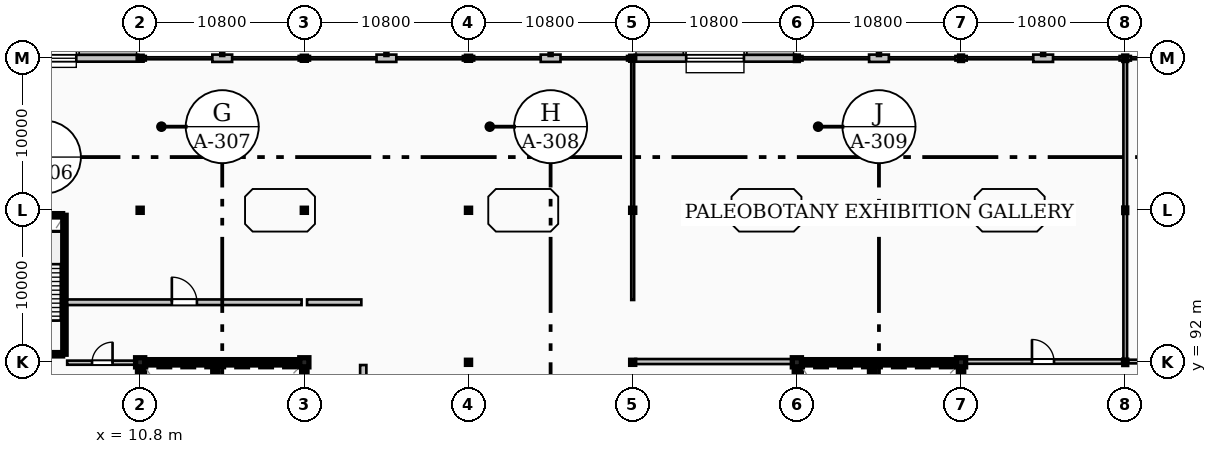
"""IFC4 building model, lengths in metres.
Left out: names, types, materials, properties, quantities, classifications, styles, units other than length and angle.
Written with IfcOpenShell. Run it as: python <this file> out.ifc"""

import sys

from ifc_helpers import new_model, si_unit, direction, frame, frame_2d, origin, origin_2d, place, context, subcontext, project, spatial, rectangle, hollow_rectangle, hollow_circle, extrude, element, fill, save


model = new_model("IFC4")
c1 = context("Model", 3, precision=1e-05, world=origin(), true_north=direction((0.0, 1.0)))
c2 = subcontext(c1, "Body", "Model", "MODEL_VIEW")
j1 = project(units=[si_unit("LENGTHUNIT", "METRE"), si_unit("PLANEANGLEUNIT", "RADIAN")], contexts=[c1])
p1 = place(None, origin())
s1 = spatial("IfcSite", under=j1, at=p1, CompositionType="ELEMENT")
p2 = place(p1, origin())
s2 = spatial("IfcBuilding", under=s1, at=p2, CompositionType="ELEMENT")
p3 = place(p2, frame((0.0, 0.0, 9.6)))
s3 = spatial("IfcBuildingStorey", under=s2, at=p3, CompositionType="ELEMENT", Elevation=9.6)
p4 = place(p3, frame((10.8, 92.0, 0.0), z_axis=(0.0, 0.0, 1.0), x_axis=(1.0, 0.0, 0.0)))
e1 = element("IfcColumn", 1, at=p4, inside=s3, PredefinedType="COLUMN", context=c2, shape_type="SweptSolid", body=[
    extrude(rectangle(XDim=0.6, YDim=0.6, at=origin_2d()), origin(), (0.0, 0.0, 1.0), 4.8),
])
for number, where, z_axis, x_axis in (
    (2, (10.8, 102.0, 0.0), (0.0, 0.0, 1.0), (1.0, 0.0, 0.0)),
    (3, (10.8, 112.0, 0.0), (0.0, 0.0, 1.0), (1.0, 0.0, 0.0)),
):
    element("IfcColumn", number, at=place(p3, frame(where, z_axis=z_axis, x_axis=x_axis)), inside=s3, PredefinedType="COLUMN", context=c2, shape_type="SweptSolid", body=[
        extrude(hollow_circle(Radius=0.136, WallThickness=0.012, at=origin_2d()), origin(), (0.0, 0.0, 1.0), 4.8),
    ])
p5 = place(p3, frame((21.6, 92.0, 0.0), z_axis=(0.0, 0.0, 1.0), x_axis=(1.0, 0.0, 0.0)))
e4 = element("IfcColumn", 4, at=p5, inside=s3, PredefinedType="COLUMN", context=c2, shape_type="SweptSolid", body=[
    extrude(rectangle(XDim=0.6, YDim=0.6, at=origin_2d()), origin(), (0.0, 0.0, 1.0), 4.8),
])
for number, where, z_axis, x_axis in (
    (5, (21.6, 102.0, 0.0), (0.0, 0.0, 1.0), (1.0, 0.0, 0.0)),
    (6, (21.6, 112.0, 0.0), (0.0, 0.0, 1.0), (1.0, 0.0, 0.0)),
    (7, (32.4, 92.0, 0.0), (0.0, 0.0, 1.0), (1.0, 0.0, 0.0)),
    (8, (32.4, 102.0, 0.0), (0.0, 0.0, 1.0), (1.0, 0.0, 0.0)),
    (9, (32.4, 112.0, 0.0), (0.0, 0.0, 1.0), (1.0, 0.0, 0.0)),
    (10, (43.2, 92.0, 0.0), (0.0, 0.0, 1.0), (1.0, 0.0, 0.0)),
    (11, (43.2, 102.0, 0.0), (0.0, 0.0, 1.0), (1.0, 0.0, 0.0)),
    (12, (43.2, 112.0, 0.0), (0.0, 0.0, 1.0), (1.0, 0.0, 0.0)),
):
    element("IfcColumn", number, at=place(p3, frame(where, z_axis=z_axis, x_axis=x_axis)), inside=s3, PredefinedType="COLUMN", context=c2, shape_type="SweptSolid", body=[
        extrude(hollow_circle(Radius=0.136, WallThickness=0.012, at=origin_2d()), origin(), (0.0, 0.0, 1.0), 4.8),
    ])
p6 = place(p3, frame((54.0, 92.0, 0.0), z_axis=(0.0, 0.0, 1.0), x_axis=(1.0, 0.0, 0.0)))
e13 = element("IfcColumn", 13, at=p6, inside=s3, PredefinedType="COLUMN", context=c2, shape_type="SweptSolid", body=[
    extrude(rectangle(XDim=0.6, YDim=0.6, at=origin_2d()), origin(), (0.0, 0.0, 1.0), 4.8),
])
for number, where, z_axis, x_axis in (
    (14, (54.0, 102.0, 0.0), (0.0, 0.0, 1.0), (1.0, 0.0, 0.0)),
    (15, (54.0, 112.0, 0.0), (0.0, 0.0, 1.0), (1.0, 0.0, 0.0)),
):
    element("IfcColumn", number, at=place(p3, frame(where, z_axis=z_axis, x_axis=x_axis)), inside=s3, PredefinedType="COLUMN", context=c2, shape_type="SweptSolid", body=[
        extrude(hollow_rectangle(XDim=0.2, YDim=0.3, WallThickness=0.012, InnerFilletRadius=0.012, OuterFilletRadius=0.025, at=origin_2d()), origin(), (0.0, 0.0, 1.0), 4.8),
    ])
p7 = place(p3, frame((64.8, 92.0, 0.0), z_axis=(0.0, 0.0, 1.0), x_axis=(1.0, 0.0, 0.0)))
e16 = element("IfcColumn", 16, at=p7, inside=s3, PredefinedType="COLUMN", context=c2, shape_type="SweptSolid", body=[
    extrude(rectangle(XDim=0.6, YDim=0.6, at=origin_2d()), origin(), (0.0, 0.0, 1.0), 4.8),
])
for number, where, z_axis, x_axis in (
    (17, (64.8, 102.0, 0.0), (0.0, 0.0, 1.0), (1.0, 0.0, 0.0)),
    (18, (64.8, 112.0, 0.0), (0.0, 0.0, 1.0), (1.0, 0.0, 0.0)),
    (19, (75.6, 92.0, 0.0), (0.0, 0.0, 1.0), (1.0, 0.0, 0.0)),
    (20, (75.6, 102.0, 0.0), (0.0, 0.0, 1.0), (1.0, 0.0, 0.0)),
    (21, (75.6, 112.0, 0.0), (0.0, 0.0, 1.0), (1.0, 0.0, 0.0)),
):
    element("IfcColumn", number, at=place(p3, frame(where, z_axis=z_axis, x_axis=x_axis)), inside=s3, PredefinedType="COLUMN", context=c2, shape_type="SweptSolid", body=[
        extrude(hollow_rectangle(XDim=0.2, YDim=0.3, WallThickness=0.012, InnerFilletRadius=0.012, OuterFilletRadius=0.025, at=origin_2d()), origin(), (0.0, 0.0, 1.0), 4.8),
    ])
p8 = place(p3, frame((75.97, 112.0, 0.0), z_axis=(0.0, 0.0, 1.0), x_axis=(-1.0, 0.0, 0.0)))
e22 = element("IfcWall", 22, at=p8, inside=s3, PredefinedType="STANDARD", context=c2, shape_type="SweptSolid", body=[
    extrude(rectangle(XDim=0.274, YDim=0.3, at=frame_2d((0.137, 0.0))), origin(), (0.0, 0.0, 1.0), 4.56),
])
p9 = place(p3, frame((70.85, 112.0, 0.0), z_axis=(0.0, 0.0, 1.0), x_axis=(-1.0, 0.0, 0.0)))
e23 = element("IfcWall", 23, at=p9, inside=s3, PredefinedType="STANDARD", context=c2, shape_type="SweptSolid", body=[
    extrude(rectangle(XDim=1.3, YDim=0.48, at=frame_2d((0.65, 0.0))), origin(), (0.0, 0.0, 1.0), 4.119),
])
for number, where, z_axis, x_axis in (
    (24, (75.504, 112.0, 0.0), (0.0, 0.0, 1.0), (-1.0, 0.0, 0.0)),
    (25, (65.17, 112.0, 0.0), (0.0, 0.0, 1.0), (-1.0, 0.0, 0.0)),
):
    element("IfcWall", number, at=place(p3, frame(where, z_axis=z_axis, x_axis=x_axis)), inside=s3, PredefinedType="STANDARD", context=c2, shape_type="SweptSolid", body=[
        extrude(rectangle(XDim=0.274, YDim=0.3, at=frame_2d((0.137, 0.0))), origin(), (0.0, 0.0, 1.0), 4.56),
    ])
p10 = place(p3, frame((60.05, 112.0, 0.0), z_axis=(0.0, 0.0, 1.0), x_axis=(-1.0, 0.0, 0.0)))
e26 = element("IfcWall", 26, at=p10, inside=s3, PredefinedType="STANDARD", context=c2, shape_type="SweptSolid", body=[
    extrude(rectangle(XDim=1.3, YDim=0.48, at=frame_2d((0.65, 0.0))), origin(), (0.0, 0.0, 1.0), 4.119),
])
for number, where, z_axis, x_axis in (
    (27, (64.704, 112.0, 0.0), (0.0, 0.0, 1.0), (-1.0, 0.0, 0.0)),
    (28, (54.37, 112.0, 0.0), (0.0, 0.0, 1.0), (-1.0, 0.0, 0.0)),
):
    element("IfcWall", number, at=place(p3, frame(where, z_axis=z_axis, x_axis=x_axis)), inside=s3, PredefinedType="STANDARD", context=c2, shape_type="SweptSolid", body=[
        extrude(rectangle(XDim=0.274, YDim=0.3, at=frame_2d((0.137, 0.0))), origin(), (0.0, 0.0, 1.0), 4.56),
    ])
p11 = place(p3, frame((53.904, 112.0, 0.0), z_axis=(0.0, 0.0, 1.0), x_axis=(-1.0, 0.0, 0.0)))
e29 = element("IfcWall", 29, at=p11, inside=s3, PredefinedType="STANDARD", context=c2, shape_type="SweptSolid", body=[
    extrude(rectangle(XDim=10.572, YDim=0.45, at=frame_2d((5.286, 0.0))), origin(), (0.0, 0.0, 1.0), 4.119),
])
p12 = place(p11, frame((3.386, 0.0, 1.0)))
e30 = element("IfcOpeningElement", 30, at=p12, cuts=e29, PredefinedType="OPENING", context=c2, shape_type="SweptSolid", body=[
    extrude(rectangle(XDim=3.8, YDim=2.1, at=frame_2d((1.9, 1.05))), frame((0.0, 0.235, 0.0), z_axis=(0.0, -1.0, 0.0), x_axis=(1.0, 0.0, 0.0)), (0.0, 0.0, 1.0), 0.47),
])
p13 = place(p3, frame((38.45, 112.0, 0.0), z_axis=(0.0, 0.0, 1.0), x_axis=(-1.0, 0.0, 0.0)))
e31 = element("IfcWall", 31, at=p13, inside=s3, PredefinedType="STANDARD", context=c2, shape_type="SweptSolid", body=[
    extrude(rectangle(XDim=1.3, YDim=0.48, at=frame_2d((0.65, 0.0))), origin(), (0.0, 0.0, 1.0), 4.119),
])
p14 = place(p3, frame((43.067, 112.0, 0.0), z_axis=(0.0, 0.0, 1.0), x_axis=(-1.0, 0.0, 0.0)))
e32 = element("IfcWall", 32, at=p14, inside=s3, PredefinedType="STANDARD", context=c2, shape_type="SweptSolid", body=[
    extrude(rectangle(XDim=0.237, YDim=0.3, at=frame_2d((0.119, 0.0))), origin(), (0.0, 0.0, 1.0), 4.56),
])
p15 = place(p3, frame((32.77, 112.0, 0.0), z_axis=(0.0, 0.0, 1.0), x_axis=(-1.0, 0.0, 0.0)))
e33 = element("IfcWall", 33, at=p15, inside=s3, PredefinedType="STANDARD", context=c2, shape_type="SweptSolid", body=[
    extrude(rectangle(XDim=0.238, YDim=0.3, at=frame_2d((0.119, 0.0))), origin(), (0.0, 0.0, 1.0), 4.56),
])
p16 = place(p3, frame((27.65, 112.0, 0.0), z_axis=(0.0, 0.0, 1.0), x_axis=(-1.0, 0.0, 0.0)))
e34 = element("IfcWall", 34, at=p16, inside=s3, PredefinedType="STANDARD", context=c2, shape_type="SweptSolid", body=[
    extrude(rectangle(XDim=1.3, YDim=0.48, at=frame_2d((0.65, 0.0))), origin(), (0.0, 0.0, 1.0), 4.119),
])
for number, where, z_axis, x_axis in (
    (35, (32.268, 112.0, 0.0), (0.0, 0.0, 1.0), (-1.0, 0.0, 0.0)),
    (36, (21.97, 112.0, 0.0), (0.0, 0.0, 1.0), (-1.0, 0.0, 0.0)),
):
    element("IfcWall", number, at=place(p3, frame(where, z_axis=z_axis, x_axis=x_axis)), inside=s3, PredefinedType="STANDARD", context=c2, shape_type="SweptSolid", body=[
        extrude(rectangle(XDim=0.238, YDim=0.3, at=frame_2d((0.119, 0.0))), origin(), (0.0, 0.0, 1.0), 4.56),
    ])
p17 = place(p3, frame((16.85, 112.0, 0.0), z_axis=(0.0, 0.0, 1.0), x_axis=(-1.0, 0.0, 0.0)))
e37 = element("IfcWall", 37, at=p17, inside=s3, PredefinedType="STANDARD", context=c2, shape_type="SweptSolid", body=[
    extrude(rectangle(XDim=1.3, YDim=0.48, at=frame_2d((0.65, 0.0))), origin(), (0.0, 0.0, 1.0), 4.119),
])
p18 = place(p3, frame((21.468, 112.0, 0.0), z_axis=(0.0, 0.0, 1.0), x_axis=(-1.0, 0.0, 0.0)))
e38 = element("IfcWall", 38, at=p18, inside=s3, PredefinedType="STANDARD", context=c2, shape_type="SweptSolid", body=[
    extrude(rectangle(XDim=0.238, YDim=0.3, at=frame_2d((0.119, 0.0))), origin(), (0.0, 0.0, 1.0), 4.56),
])
p19 = place(p3, frame((11.17, 112.0, 0.0), z_axis=(0.0, 0.0, 1.0), x_axis=(-1.0, 0.0, 0.0)))
e39 = element("IfcWall", 39, at=p19, inside=s3, PredefinedType="STANDARD", context=c2, shape_type="SweptSolid", body=[
    extrude(rectangle(XDim=0.237, YDim=0.3, at=frame_2d((0.119, 0.0))), origin(), (0.0, 0.0, 1.0), 4.56),
])
p20 = place(p3, frame((10.667, 112.0, 0.0), z_axis=(0.0, 0.0, 1.0), x_axis=(-1.0, 0.0, 0.0)))
e40 = element("IfcWall", 40, at=p20, inside=s3, PredefinedType="STANDARD", context=c2, shape_type="SweptSolid", body=[
    extrude(rectangle(XDim=10.535, YDim=0.45, at=frame_2d((5.268, 0.0))), origin(), (0.0, 0.0, 1.0), 4.119),
])
p21 = place(p20, frame((4.067, 0.0, 1.0)))
e41 = element("IfcOpeningElement", 41, at=p21, cuts=e40, PredefinedType="OPENING", context=c2, shape_type="SweptSolid", body=[
    extrude(rectangle(XDim=2.4, YDim=2.4, at=frame_2d((1.2, 1.2))), frame((0.0, 0.235, 0.0), z_axis=(0.0, -1.0, 0.0), x_axis=(1.0, 0.0, 0.0)), (0.0, 0.0, 1.0), 0.47),
])
p22 = place(p3, frame((11.1, 92.0, 0.0), z_axis=(0.0, 0.0, 1.0), x_axis=(1.0, 0.0, 0.0)))
e42 = element("IfcWall", 42, at=p22, inside=s3, PredefinedType="SHEAR", context=c2, shape_type="SweptSolid", body=[
    extrude(rectangle(XDim=10.2, YDim=0.35, at=frame_2d((5.1, 0.0))), origin(), (0.0, 0.0, 1.0), 4.56),
])
p23 = place(p3, frame((10.8, 82.3, 0.0), z_axis=(0.0, 0.0, 1.0), x_axis=(0.0, 1.0, 0.0)))
e43 = element("IfcWall", 43, at=p23, inside=s3, PredefinedType="SHEAR", context=c2, shape_type="SweptSolid", body=[
    extrude(rectangle(XDim=9.4, YDim=0.35, at=frame_2d((4.7, 0.0))), origin(), (0.0, 0.0, 1.0), 4.56),
])
p24 = place(p3, frame((21.6, 82.3, 0.0), z_axis=(0.0, 0.0, 1.0), x_axis=(0.0, 1.0, 0.0)))
e44 = element("IfcWall", 44, at=p24, inside=s3, PredefinedType="SHEAR", context=c2, shape_type="SweptSolid", body=[
    extrude(rectangle(XDim=9.4, YDim=0.35, at=frame_2d((4.7, 0.0))), origin(), (0.0, 0.0, 1.0), 4.56),
])
p25 = place(p24, frame((0.88, 0.0, 0.0)))
e45 = element("IfcOpeningElement", 45, at=p25, cuts=e44, PredefinedType="OPENING", context=c2, shape_type="SweptSolid", body=[
    extrude(rectangle(XDim=1.8, YDim=2.25, at=frame_2d((0.9, 1.125))), frame((0.0, 0.185, 0.0), z_axis=(0.0, -1.0, 0.0), x_axis=(1.0, 0.0, 0.0)), (0.0, 0.0, 1.0), 0.37),
])
p26 = place(p3, frame((15.75, 82.175, 0.0), z_axis=(0.0, 0.0, 1.0), x_axis=(0.0, 1.0, 0.0)))
e46 = element("IfcWall", 46, at=p26, inside=s3, PredefinedType="SHEAR", context=c2, shape_type="SweptSolid", body=[
    extrude(rectangle(XDim=9.65, YDim=0.35, at=frame_2d((4.825, 0.0))), origin(), (0.0, 0.0, 1.0), 4.56),
])
p27 = place(p26, frame((0.9, 0.0, 0.0)))
e47 = element("IfcOpeningElement", 47, at=p27, cuts=e46, PredefinedType="OPENING", context=c2, shape_type="SweptSolid", body=[
    extrude(rectangle(XDim=1.1, YDim=2.2, at=frame_2d((0.55, 1.1))), frame((0.0, 0.185, 0.0), z_axis=(0.0, -1.0, 0.0), x_axis=(1.0, 0.0, 0.0)), (0.0, 0.0, 1.0), 0.37),
])
p28 = place(p3, frame((54.3, 92.0, 0.0), z_axis=(0.0, 0.0, 1.0), x_axis=(1.0, 0.0, 0.0)))
e48 = element("IfcWall", 48, at=p28, inside=s3, PredefinedType="SHEAR", context=c2, shape_type="SweptSolid", body=[
    extrude(rectangle(XDim=10.2, YDim=0.35, at=frame_2d((5.1, 0.0))), origin(), (0.0, 0.0, 1.0), 4.56),
])
p29 = place(p3, frame((54.0, 82.3, 0.0), z_axis=(0.0, 0.0, 1.0), x_axis=(0.0, 1.0, 0.0)))
e49 = element("IfcWall", 49, at=p29, inside=s3, PredefinedType="SHEAR", context=c2, shape_type="SweptSolid", body=[
    extrude(rectangle(XDim=9.4, YDim=0.35, at=frame_2d((4.7, 0.0))), origin(), (0.0, 0.0, 1.0), 4.56),
])
p30 = place(p3, frame((64.8, 82.3, 0.0), z_axis=(0.0, 0.0, 1.0), x_axis=(0.0, 1.0, 0.0)))
e50 = element("IfcWall", 50, at=p30, inside=s3, PredefinedType="SHEAR", context=c2, shape_type="SweptSolid", body=[
    extrude(rectangle(XDim=9.4, YDim=0.35, at=frame_2d((4.7, 0.0))), origin(), (0.0, 0.0, 1.0), 4.56),
])
p31 = place(p30, frame((0.88, 0.0, 0.0)))
e51 = element("IfcOpeningElement", 51, at=p31, cuts=e50, PredefinedType="OPENING", context=c2, shape_type="SweptSolid", body=[
    extrude(rectangle(XDim=1.8, YDim=2.25, at=frame_2d((0.9, 1.125))), frame((0.0, 0.185, 0.0), z_axis=(0.0, -1.0, 0.0), x_axis=(1.0, 0.0, 0.0)), (0.0, 0.0, 1.0), 0.37),
])
p32 = place(p3, frame((58.95, 82.175, 0.0), z_axis=(0.0, 0.0, 1.0), x_axis=(0.0, 1.0, 0.0)))
e52 = element("IfcWall", 52, at=p32, inside=s3, PredefinedType="SHEAR", context=c2, shape_type="SweptSolid", body=[
    extrude(rectangle(XDim=9.65, YDim=0.35, at=frame_2d((4.825, 0.0))), origin(), (0.0, 0.0, 1.0), 4.56),
])
p33 = place(p32, frame((0.9, 0.0, 0.0)))
e53 = element("IfcOpeningElement", 53, at=p33, cuts=e52, PredefinedType="OPENING", context=c2, shape_type="SweptSolid", body=[
    extrude(rectangle(XDim=1.1, YDim=2.2, at=frame_2d((0.55, 1.1))), frame((0.0, 0.185, 0.0), z_axis=(0.0, -1.0, 0.0), x_axis=(1.0, 0.0, 0.0)), (0.0, 0.0, 1.0), 0.37),
])
p34 = place(p3, frame((5.82, 92.53, 0.0), z_axis=(0.0, 0.0, 1.0), x_axis=(0.0, 1.0, 0.0)))
e54 = element("IfcWall", 54, at=p34, inside=s3, PredefinedType="SHEAR", context=c2, shape_type="SweptSolid", body=[
    extrude(rectangle(XDim=9.14, YDim=0.22, at=frame_2d((4.57, 0.0))), origin(), (0.0, 0.0, 1.0), 4.56),
])
p35 = place(p3, frame((1.3, 101.67, 0.0), z_axis=(0.0, 0.0, 1.0), x_axis=(1.0, 0.0, 0.0)))
e55 = element("IfcWall", 55, at=p35, inside=s3, PredefinedType="SHEAR", context=c2, shape_type="SweptSolid", body=[
    extrude(rectangle(XDim=4.4, YDim=0.22, at=frame_2d((2.2, 0.0))), origin(), (0.0, 0.0, 1.0), 4.56),
])
p36 = place(p3, frame((1.3, 92.53, 0.0), z_axis=(0.0, 0.0, 1.0), x_axis=(1.0, 0.0, 0.0)))
e56 = element("IfcWall", 56, at=p36, inside=s3, PredefinedType="SHEAR", context=c2, shape_type="SweptSolid", body=[
    extrude(rectangle(XDim=4.4, YDim=0.22, at=frame_2d((2.2, 0.0))), origin(), (0.0, 0.0, 1.0), 4.56),
])
p37 = place(p36, frame((1.65, 0.0, 0.0)))
e57 = element("IfcOpeningElement", 57, at=p37, cuts=e56, PredefinedType="OPENING", context=c2, shape_type="SweptSolid", body=[
    extrude(rectangle(XDim=1.1, YDim=2.2, at=frame_2d((0.55, 1.1))), frame((0.0, 0.12, 0.0), z_axis=(0.0, -1.0, 0.0), x_axis=(1.0, 0.0, 0.0)), (0.0, 0.0, 1.0), 0.24),
])
p38 = place(p3, frame((6.0, 91.975, 0.0), z_axis=(0.0, 0.0, 1.0), x_axis=(1.0, 0.0, 0.0)))
e58 = element("IfcWall", 58, at=p38, inside=s3, PredefinedType="PARTITIONING", context=c2, shape_type="SweptSolid", body=[
    extrude(rectangle(XDim=4.62, YDim=0.27, at=frame_2d((2.31, 0.0))), origin(), (0.0, 0.0, 1.0), 4.119),
])
p39 = place(p38, frame((1.635, 0.0, 0.0)))
e59 = element("IfcOpeningElement", 59, at=p39, cuts=e58, PredefinedType="OPENING", context=c2, shape_type="SweptSolid", body=[
    extrude(rectangle(XDim=1.35, YDim=2.35, at=frame_2d((0.675, 1.175))), frame((0.0, 0.145, 0.0), z_axis=(0.0, -1.0, 0.0), x_axis=(1.0, 0.0, 0.0)), (0.0, 0.0, 1.0), 0.29),
])
p40 = place(p3, frame((64.98, 92.05, 0.0), z_axis=(0.0, 0.0, 1.0), x_axis=(1.0, 0.0, 0.0)))
e60 = element("IfcWall", 60, at=p40, inside=s3, PredefinedType="PARTITIONING", context=c2, shape_type="SweptSolid", body=[
    extrude(rectangle(XDim=10.42, YDim=0.29, at=frame_2d((5.21, 0.0))), origin(), (0.0, 0.0, 1.0), 4.119),
])
p41 = place(p40, frame((4.485, 0.0, 0.0)))
e61 = element("IfcOpeningElement", 61, at=p41, cuts=e60, PredefinedType="OPENING", context=c2, shape_type="SweptSolid", body=[
    extrude(rectangle(XDim=1.45, YDim=2.35, at=frame_2d((0.725, 1.175))), frame((0.0, 0.155, 0.0), z_axis=(0.0, -1.0, 0.0), x_axis=(1.0, 0.0, 0.0)), (0.0, 0.0, 1.0), 0.31),
])
p42 = place(p3, frame((75.8, 92.05, 0.0), z_axis=(0.0, 0.0, 1.0), x_axis=(1.0, 0.0, 0.0)))
e62 = element("IfcWall", 62, at=p42, inside=s3, PredefinedType="SOLIDWALL", context=c2, shape_type="SweptSolid", body=[
    extrude(rectangle(XDim=10.4, YDim=0.24, at=frame_2d((5.2, 0.0))), origin(), (0.0, 0.0, 1.0), 4.119),
])
p43 = place(p3, frame((6.0, 95.95, 0.0), z_axis=(0.0, 0.0, 1.0), x_axis=(1.0, 0.0, 0.0)))
e63 = element("IfcWall", 63, at=p43, inside=s3, PredefinedType="PARTITIONING", context=c2, shape_type="SweptSolid", body=[
    extrude(rectangle(XDim=15.42, YDim=0.37, at=frame_2d((7.71, 0.0))), origin(), (0.0, 0.0, 1.0), 4.52),
])
p44 = place(p43, frame((6.885, 0.0, 0.0)))
e64 = element("IfcOpeningElement", 64, at=p44, cuts=e63, PredefinedType="OPENING", context=c2, shape_type="SweptSolid", body=[
    extrude(rectangle(XDim=1.65, YDim=2.4, at=frame_2d((0.825, 1.2))), frame((0.0, 0.195, 0.0), z_axis=(0.0, -1.0, 0.0), x_axis=(1.0, 0.0, 0.0)), (0.0, 0.0, 1.0), 0.39),
])
p45 = place(p3, frame((25.475, 86.3, 0.0), z_axis=(0.0, 0.0, 1.0), x_axis=(0.0, 1.0, 0.0)))
e65 = element("IfcWall", 65, at=p45, inside=s3, PredefinedType="PARTITIONING", context=c2, shape_type="SweptSolid", body=[
    extrude(rectangle(XDim=5.52, YDim=0.41, at=frame_2d((2.76, 0.0))), origin(), (0.0, 0.0, 1.0), 4.52),
])
p46 = place(p45, frame((1.835, 0.0, 0.0)))
e66 = element("IfcOpeningElement", 66, at=p46, cuts=e65, PredefinedType="OPENING", context=c2, shape_type="SweptSolid", body=[
    extrude(rectangle(XDim=1.85, YDim=2.45, at=frame_2d((0.925, 1.225))), frame((0.0, 0.215, 0.0), z_axis=(0.0, -1.0, 0.0), x_axis=(1.0, 0.0, 0.0)), (0.0, 0.0, 1.0), 0.43),
])
p47 = place(p3, frame((43.38, 92.05, 0.0), z_axis=(0.0, 0.0, 1.0), x_axis=(1.0, 0.0, 0.0)))
e67 = element("IfcWall", 67, at=p47, inside=s3, PredefinedType="PARTITIONING", context=c2, shape_type="SweptSolid", body=[
    extrude(rectangle(XDim=10.44, YDim=0.33, at=frame_2d((5.22, 0.0))), origin(), (0.0, 0.0, 1.0), 4.119),
])
p48 = place(p3, frame((21.78, 95.95, 0.0), z_axis=(0.0, 0.0, 1.0), x_axis=(1.0, 0.0, 0.0)))
e68 = element("IfcWall", 68, at=p48, inside=s3, PredefinedType="PARTITIONING", context=c2, shape_type="SweptSolid", body=[
    extrude(rectangle(XDim=3.57, YDim=0.37, at=frame_2d((1.785, 0.0))), origin(), (0.0, 0.0, 1.0), 4.52),
])
p49 = place(p3, frame((43.2, 96.1, 0.0), z_axis=(0.0, 0.0, 1.0), x_axis=(0.0, 1.0, 0.0)))
e69 = element("IfcWall", 69, at=p49, inside=s3, PredefinedType="PARTITIONING", context=c2, shape_type="SweptSolid", body=[
    extrude(rectangle(XDim=5.7, YDim=0.19, at=frame_2d((2.85, 0.0))), origin(), (0.0, 0.0, 1.0), 4.059),
])
p50 = place(p3, frame((43.2, 102.2, 0.0), z_axis=(0.0, 0.0, 1.0), x_axis=(0.0, 1.0, 0.0)))
e70 = element("IfcWall", 70, at=p50, inside=s3, PredefinedType="PARTITIONING", context=c2, shape_type="SweptSolid", body=[
    extrude(rectangle(XDim=9.62, YDim=0.19, at=frame_2d((4.81, 0.0))), origin(), (0.0, 0.0, 1.0), 4.059),
])
for number, where, z_axis, x_axis in (
    (71, (75.6, 92.18, 0.0), (0.0, 0.0, 1.0), (0.0, 1.0, 0.0)),
    (72, (75.6, 102.2, 0.0), (0.0, 0.0, 1.0), (0.0, 1.0, 0.0)),
):
    element("IfcWall", number, at=place(p3, frame(where, z_axis=z_axis, x_axis=x_axis)), inside=s3, PredefinedType="SOLIDWALL", context=c2, shape_type="SweptSolid", body=[
        extrude(rectangle(XDim=9.62, YDim=0.24, at=frame_2d((4.81, 0.0))), origin(), (0.0, 0.0, 1.0), 4.059),
    ])
p51 = place(p12, origin())
e73 = element("IfcWindow", 73, at=p51, inside=s3, PartitioningType="SINGLE_PANEL", PredefinedType="WINDOW", context=c2, shape_type="SweptSolid", body=[
    extrude(rectangle(XDim=3.8, YDim=2.1, at=frame_2d((1.9, 1.05))), frame((0.0, 0.03, 0.0), z_axis=(0.0, -1.0, 0.0), x_axis=(1.0, 0.0, 0.0)), (0.0, 0.0, 1.0), 0.06),
])
fill(e30, e73)
p52 = place(p21, origin())
e74 = element("IfcWindow", 74, at=p52, inside=s3, PartitioningType="SINGLE_PANEL", PredefinedType="WINDOW", context=c2, shape_type="SweptSolid", body=[
    extrude(rectangle(XDim=2.4, YDim=2.4, at=frame_2d((1.2, 1.2))), frame((0.0, 0.03, 0.0), z_axis=(0.0, -1.0, 0.0), x_axis=(1.0, 0.0, 0.0)), (0.0, 0.0, 1.0), 0.06),
])
fill(e41, e74)
p53 = place(p39, origin())
e75 = element("IfcDoor", 75, at=p53, inside=s3, OperationType="SINGLE_SWING_RIGHT", PredefinedType="DOOR", context=c2, shape_type="SweptSolid", body=[
    extrude(rectangle(XDim=1.35, YDim=2.35, at=frame_2d((0.675, 1.175))), frame((0.0, 0.025, 0.0), z_axis=(0.0, -1.0, 0.0), x_axis=(1.0, 0.0, 0.0)), (0.0, 0.0, 1.0), 0.05),
])
fill(e59, e75)
p54 = place(p41, origin())
e76 = element("IfcDoor", 76, at=p54, inside=s3, OperationType="SINGLE_SWING_LEFT", PredefinedType="DOOR", context=c2, shape_type="SweptSolid", body=[
    extrude(rectangle(XDim=1.45, YDim=2.35, at=frame_2d((0.725, 1.175))), frame((0.0, 0.025, 0.0), z_axis=(0.0, -1.0, 0.0), x_axis=(1.0, 0.0, 0.0)), (0.0, 0.0, 1.0), 0.05),
])
fill(e61, e76)
p55 = place(p44, origin())
e77 = element("IfcDoor", 77, at=p55, inside=s3, OperationType="SINGLE_SWING_LEFT", PredefinedType="DOOR", context=c2, shape_type="SweptSolid", body=[
    extrude(rectangle(XDim=1.65, YDim=2.4, at=frame_2d((0.825, 1.2))), frame((0.0, 0.025, 0.0), z_axis=(0.0, -1.0, 0.0), x_axis=(1.0, 0.0, 0.0)), (0.0, 0.0, 1.0), 0.05),
])
fill(e64, e77)
save(model, sys.argv[1])
